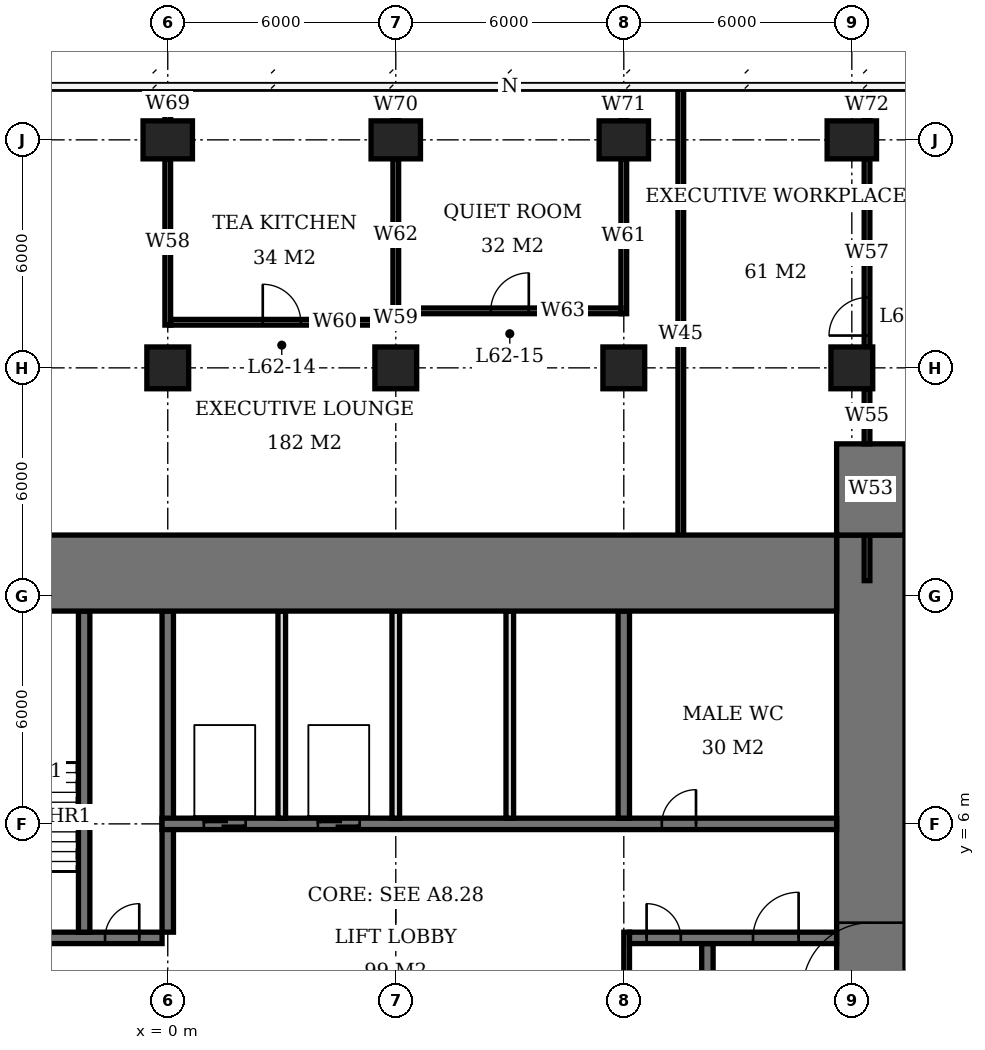
"""IFC4 building model, lengths in metres.
Left out: names, types, materials, properties, quantities, classifications, styles, units other than length and angle.
Written with IfcOpenShell. Run it as: python <this file> out.ifc"""

import sys

from ifc_helpers import new_model, si_unit, direction, frame, frame_2d, origin, origin_2d, place, context, subcontext, project, spatial, rectangle, extrude, element, fill, save


model = new_model("IFC4")
c1 = context("Model", 3, precision=1e-05, world=origin(), true_north=direction((0.0, 1.0)))
c2 = subcontext(c1, "Body", "Model", "MODEL_VIEW")
j1 = project(units=[si_unit("LENGTHUNIT", "METRE"), si_unit("PLANEANGLEUNIT", "RADIAN")], contexts=[c1])
p1 = place(None, origin())
s1 = spatial("IfcSite", under=j1, at=p1, CompositionType="ELEMENT")
p2 = place(p1, origin())
s2 = spatial("IfcBuilding", under=s1, at=p2, CompositionType="ELEMENT")
p3 = place(p2, frame((0.0, 0.0, 252.8)))
s3 = spatial("IfcBuildingStorey", under=s2, at=p3, CompositionType="ELEMENT", Elevation=252.8)
p4 = place(p3, frame((0.0, 18.0, 0.0), z_axis=(0.0, 0.0, 1.0), x_axis=(1.0, 0.0, 0.0)))
e1 = element("IfcColumn", 1, at=p4, inside=s3, PredefinedType="COLUMN", context=c2, shape_type="SweptSolid", body=[
    extrude(rectangle(XDim=1.1, YDim=1.1, at=origin_2d()), origin(), (0.0, 0.0, 1.0), 3.9),
])
p5 = place(p3, frame((0.0, 24.0, 0.0), z_axis=(0.0, 0.0, 1.0), x_axis=(1.0, 0.0, 0.0)))
e2 = element("IfcColumn", 2, at=p5, inside=s3, PredefinedType="COLUMN", context=c2, shape_type="SweptSolid", body=[
    extrude(rectangle(XDim=1.3, YDim=1.0, at=origin_2d()), origin(), (0.0, 0.0, 1.0), 3.9),
])
p6 = place(p3, frame((6.0, 18.0, 0.0), z_axis=(0.0, 0.0, 1.0), x_axis=(1.0, 0.0, 0.0)))
e3 = element("IfcColumn", 3, at=p6, inside=s3, PredefinedType="COLUMN", context=c2, shape_type="SweptSolid", body=[
    extrude(rectangle(XDim=1.1, YDim=1.1, at=origin_2d()), origin(), (0.0, 0.0, 1.0), 3.9),
])
p7 = place(p3, frame((6.0, 24.0, 0.0), z_axis=(0.0, 0.0, 1.0), x_axis=(1.0, 0.0, 0.0)))
e4 = element("IfcColumn", 4, at=p7, inside=s3, PredefinedType="COLUMN", context=c2, shape_type="SweptSolid", body=[
    extrude(rectangle(XDim=1.3, YDim=1.0, at=origin_2d()), origin(), (0.0, 0.0, 1.0), 3.9),
])
p8 = place(p3, frame((12.0, 18.0, 0.0), z_axis=(0.0, 0.0, 1.0), x_axis=(1.0, 0.0, 0.0)))
e5 = element("IfcColumn", 5, at=p8, inside=s3, PredefinedType="COLUMN", context=c2, shape_type="SweptSolid", body=[
    extrude(rectangle(XDim=1.1, YDim=1.1, at=origin_2d()), origin(), (0.0, 0.0, 1.0), 3.9),
])
p9 = place(p3, frame((12.0, 24.0, 0.0), z_axis=(0.0, 0.0, 1.0), x_axis=(1.0, 0.0, 0.0)))
e6 = element("IfcColumn", 6, at=p9, inside=s3, PredefinedType="COLUMN", context=c2, shape_type="SweptSolid", body=[
    extrude(rectangle(XDim=1.3, YDim=1.0, at=origin_2d()), origin(), (0.0, 0.0, 1.0), 3.9),
])
p10 = place(p3, frame((18.0, 18.0, 0.0), z_axis=(0.0, 0.0, 1.0), x_axis=(1.0, 0.0, 0.0)))
e7 = element("IfcColumn", 7, at=p10, inside=s3, PredefinedType="COLUMN", context=c2, shape_type="SweptSolid", body=[
    extrude(rectangle(XDim=1.1, YDim=1.1, at=origin_2d()), origin(), (0.0, 0.0, 1.0), 3.9),
])
p11 = place(p3, frame((18.0, 24.0, 0.0), z_axis=(0.0, 0.0, 1.0), x_axis=(1.0, 0.0, 0.0)))
e8 = element("IfcColumn", 8, at=p11, inside=s3, PredefinedType="COLUMN", context=c2, shape_type="SweptSolid", body=[
    extrude(rectangle(XDim=1.3, YDim=1.0, at=origin_2d()), origin(), (0.0, 0.0, 1.0), 3.9),
])
p12 = place(p3, frame((-5.6, 12.6, 0.0), z_axis=(0.0, 0.0, 1.0), x_axis=(1.0, 0.0, 0.0)))
e9 = element("IfcWall", 9, at=p12, inside=s3, PredefinedType="SHEAR", context=c2, shape_type="SweptSolid", body=[
    extrude(rectangle(XDim=23.2, YDim=2.0, at=frame_2d((11.6, 0.0))), origin(), (0.0, 0.0, 1.0), 3.9),
])
p13 = place(p3, frame((18.5, -7.6, 0.0), z_axis=(0.0, 0.0, 1.0), x_axis=(0.0, 1.0, 0.0)))
e10 = element("IfcWall", 10, at=p13, inside=s3, PredefinedType="SHEAR", context=c2, shape_type="SweptSolid", body=[
    extrude(rectangle(XDim=21.2, YDim=1.8, at=frame_2d((10.6, 0.0))), origin(), (0.0, 0.0, 1.0), 3.9),
])
p14 = place(p13, frame((9.2, 0.0, 0.0)))
e11 = element("IfcOpeningElement", 11, at=p14, cuts=e10, PredefinedType="OPENING", context=c2, shape_type="SweptSolid", body=[
    extrude(rectangle(XDim=1.8, YDim=2.4, at=frame_2d((0.9, 1.2))), frame((0.0, 0.91, 0.0), z_axis=(0.0, -1.0, 0.0), x_axis=(1.0, 0.0, 0.0)), (0.0, 0.0, 1.0), 1.82),
])
p15 = place(p3, frame((18.5, 13.6, 0.0), z_axis=(0.0, 0.0, 1.0), x_axis=(0.0, 1.0, 0.0)))
e12 = element("IfcWall", 12, at=p15, inside=s3, PredefinedType="SHEAR", context=c2, shape_type="SweptSolid", body=[
    extrude(rectangle(XDim=2.4, YDim=1.8, at=frame_2d((1.2, 0.0))), origin(), (0.0, 0.0, 1.0), 3.9),
])
p16 = place(p3, frame((-5.6, 3.0, 0.0), z_axis=(0.0, 0.0, 1.0), x_axis=(1.0, 0.0, 0.0)))
e13 = element("IfcWall", 13, at=p16, inside=s3, PredefinedType="SHEAR", context=c2, shape_type="SweptSolid", body=[
    extrude(rectangle(XDim=5.45, YDim=0.3, at=frame_2d((2.725, 0.0))), origin(), (0.0, 0.0, 1.0), 3.9),
])
p17 = place(p16, frame((0.4, 0.0, 0.0)))
e14 = element("IfcOpeningElement", 14, at=p17, cuts=e13, PredefinedType="OPENING", context=c2, shape_type="SweptSolid", body=[
    extrude(rectangle(XDim=1.2, YDim=2.1, at=frame_2d((0.6, 1.05))), frame((0.0, 0.16, 0.0), z_axis=(0.0, -1.0, 0.0), x_axis=(1.0, 0.0, 0.0)), (0.0, 0.0, 1.0), 0.32),
])
p18 = place(p16, frame((3.95, 0.0, 0.0)))
e15 = element("IfcOpeningElement", 15, at=p18, cuts=e13, PredefinedType="OPENING", context=c2, shape_type="SweptSolid", body=[
    extrude(rectangle(XDim=0.9, YDim=2.1, at=frame_2d((0.45, 1.05))), frame((0.0, 0.16, 0.0), z_axis=(0.0, -1.0, 0.0), x_axis=(1.0, 0.0, 0.0)), (0.0, 0.0, 1.0), 0.32),
])
p19 = place(p3, frame((12.15, 3.0, 0.0), z_axis=(0.0, 0.0, 1.0), x_axis=(1.0, 0.0, 0.0)))
e16 = element("IfcWall", 16, at=p19, inside=s3, PredefinedType="SHEAR", context=c2, shape_type="SweptSolid", body=[
    extrude(rectangle(XDim=5.45, YDim=0.3, at=frame_2d((2.725, 0.0))), origin(), (0.0, 0.0, 1.0), 3.9),
])
p20 = place(p19, frame((3.25, 0.0, 0.0)))
e17 = element("IfcOpeningElement", 17, at=p20, cuts=e16, PredefinedType="OPENING", context=c2, shape_type="SweptSolid", body=[
    extrude(rectangle(XDim=1.2, YDim=2.1, at=frame_2d((0.6, 1.05))), frame((0.0, 0.16, 0.0), z_axis=(0.0, -1.0, 0.0), x_axis=(1.0, 0.0, 0.0)), (0.0, 0.0, 1.0), 0.32),
])
p21 = place(p19, frame((0.45, 0.0, 0.0)))
e18 = element("IfcOpeningElement", 18, at=p21, cuts=e16, PredefinedType="OPENING", context=c2, shape_type="SweptSolid", body=[
    extrude(rectangle(XDim=0.9, YDim=2.1, at=frame_2d((0.45, 1.05))), frame((0.0, 0.16, 0.0), z_axis=(0.0, -1.0, 0.0), x_axis=(1.0, 0.0, 0.0)), (0.0, 0.0, 1.0), 0.32),
])
p22 = place(p3, frame((-0.15, 6.0, 0.0), z_axis=(0.0, 0.0, 1.0), x_axis=(1.0, 0.0, 0.0)))
e19 = element("IfcWall", 19, at=p22, inside=s3, PredefinedType="SHEAR", context=c2, shape_type="SweptSolid", body=[
    extrude(rectangle(XDim=17.75, YDim=0.3, at=frame_2d((8.875, 0.0))), origin(), (0.0, 0.0, 1.0), 3.9),
])
p23 = place(p22, frame((13.15, 0.0, 0.0)))
e20 = element("IfcOpeningElement", 20, at=p23, cuts=e19, PredefinedType="OPENING", context=c2, shape_type="SweptSolid", body=[
    extrude(rectangle(XDim=0.9, YDim=2.1, at=frame_2d((0.45, 1.05))), frame((0.0, 0.16, 0.0), z_axis=(0.0, -1.0, 0.0), x_axis=(1.0, 0.0, 0.0)), (0.0, 0.0, 1.0), 0.32),
])
p24 = place(p22, frame((1.1, 0.0, 0.0)))
e21 = element("IfcOpeningElement", 21, at=p24, cuts=e19, PredefinedType="OPENING", context=c2, shape_type="SweptSolid", body=[
    extrude(rectangle(XDim=1.1, YDim=2.1, at=frame_2d((0.55, 1.05))), frame((0.0, 0.16, 0.0), z_axis=(0.0, -1.0, 0.0), x_axis=(1.0, 0.0, 0.0)), (0.0, 0.0, 1.0), 0.32),
])
p25 = place(p22, frame((4.1, 0.0, 0.0)))
e22 = element("IfcOpeningElement", 22, at=p25, cuts=e19, PredefinedType="OPENING", context=c2, shape_type="SweptSolid", body=[
    extrude(rectangle(XDim=1.1, YDim=2.1, at=frame_2d((0.55, 1.05))), frame((0.0, 0.16, 0.0), z_axis=(0.0, -1.0, 0.0), x_axis=(1.0, 0.0, 0.0)), (0.0, 0.0, 1.0), 0.32),
])
p26 = place(p3, frame((0.0, 3.15, 0.0), z_axis=(0.0, 0.0, 1.0), x_axis=(0.0, 1.0, 0.0)))
e23 = element("IfcWall", 23, at=p26, inside=s3, PredefinedType="SHEAR", context=c2, shape_type="SweptSolid", body=[
    extrude(rectangle(XDim=8.45, YDim=0.3, at=frame_2d((4.225, 0.0))), origin(), (0.0, 0.0, 1.0), 3.9),
])
p27 = place(p3, frame((12.0, 6.15, 0.0), z_axis=(0.0, 0.0, 1.0), x_axis=(0.0, 1.0, 0.0)))
e24 = element("IfcWall", 24, at=p27, inside=s3, PredefinedType="SHEAR", context=c2, shape_type="SweptSolid", body=[
    extrude(rectangle(XDim=5.45, YDim=0.3, at=frame_2d((2.725, 0.0))), origin(), (0.0, 0.0, 1.0), 3.9),
])
for number, where, z_axis, x_axis in (
    (25, (-2.2, 3.15, 0.0), (0.0, 0.0, 1.0), (0.0, 1.0, 0.0)),
    (26, (14.2, -5.6, 0.0), (0.0, 0.0, 1.0), (0.0, 1.0, 0.0)),
):
    element("IfcWall", number, at=place(p3, frame(where, z_axis=z_axis, x_axis=x_axis)), inside=s3, PredefinedType="SHEAR", context=c2, shape_type="SweptSolid", body=[
        extrude(rectangle(XDim=8.45, YDim=0.3, at=frame_2d((4.225, 0.0))), origin(), (0.0, 0.0, 1.0), 3.9),
    ])
for number, where, z_axis, x_axis in (
    (27, (3.0, 6.15, 0.0), (0.0, 0.0, 1.0), (0.0, 1.0, 0.0)),
    (28, (6.0, 6.15, 0.0), (0.0, 0.0, 1.0), (0.0, 1.0, 0.0)),
    (29, (9.0, 6.15, 0.0), (0.0, 0.0, 1.0), (0.0, 1.0, 0.0)),
):
    element("IfcWall", number, at=place(p3, frame(where, z_axis=z_axis, x_axis=x_axis)), inside=s3, PredefinedType="SOLIDWALL", context=c2, shape_type="SweptSolid", body=[
        extrude(rectangle(XDim=5.45, YDim=0.2, at=frame_2d((2.725, 0.0))), origin(), (0.0, 0.0, 1.0), 3.9),
    ])
p28 = place(p3, frame((0.075, 19.2, 0.0), z_axis=(0.0, 0.0, 1.0), x_axis=(1.0, 0.0, 0.0)))
e30 = element("IfcWall", 30, at=p28, inside=s3, PredefinedType="PARTITIONING", context=c2, shape_type="SweptSolid", body=[
    extrude(rectangle(XDim=5.85, YDim=0.15, at=frame_2d((2.925, 0.0))), origin(), (0.0, 0.0, 1.0), 3.65),
])
p29 = place(p28, frame((2.425, 0.0, 0.0)))
e31 = element("IfcOpeningElement", 31, at=p29, cuts=e30, PredefinedType="OPENING", context=c2, shape_type="SweptSolid", body=[
    extrude(rectangle(XDim=1.0, YDim=2.4, at=frame_2d((0.5, 1.2))), frame((0.0, 0.085, 0.0), z_axis=(0.0, -1.0, 0.0), x_axis=(1.0, 0.0, 0.0)), (0.0, 0.0, 1.0), 0.17),
])
p30 = place(p3, frame((6.075, 19.5, 0.0), z_axis=(0.0, 0.0, 1.0), x_axis=(1.0, 0.0, 0.0)))
e32 = element("IfcWall", 32, at=p30, inside=s3, PredefinedType="PARTITIONING", context=c2, shape_type="SweptSolid", body=[
    extrude(rectangle(XDim=5.85, YDim=0.15, at=frame_2d((2.925, 0.0))), origin(), (0.0, 0.0, 1.0), 3.65),
])
p31 = place(p30, frame((2.425, 0.0, 0.0)))
e33 = element("IfcOpeningElement", 33, at=p31, cuts=e32, PredefinedType="OPENING", context=c2, shape_type="SweptSolid", body=[
    extrude(rectangle(XDim=1.0, YDim=2.4, at=frame_2d((0.5, 1.2))), frame((0.0, 0.085, 0.0), z_axis=(0.0, -1.0, 0.0), x_axis=(1.0, 0.0, 0.0)), (0.0, 0.0, 1.0), 0.17),
])
p32 = place(p3, frame((0.0, 19.125, 0.0), z_axis=(0.0, 0.0, 1.0), x_axis=(0.0, 1.0, 0.0)))
e34 = element("IfcWall", 34, at=p32, inside=s3, PredefinedType="PARTITIONING", context=c2, shape_type="SweptSolid", body=[
    extrude(rectangle(XDim=4.375, YDim=0.15, at=frame_2d((2.188, 0.0))), origin(), (0.0, 0.0, 1.0), 3.65),
])
p33 = place(p3, frame((0.0, 24.5, 0.0), z_axis=(0.0, 0.0, 1.0), x_axis=(0.0, 1.0, 0.0)))
e35 = element("IfcWall", 35, at=p33, inside=s3, PredefinedType="PARTITIONING", context=c2, shape_type="SweptSolid", body=[
    extrude(rectangle(XDim=0.875, YDim=0.15, at=frame_2d((0.438, 0.0))), origin(), (0.0, 0.0, 1.0), 3.65),
])
p34 = place(p3, frame((6.0, 19.125, 0.0), z_axis=(0.0, 0.0, 1.0), x_axis=(0.0, 1.0, 0.0)))
e36 = element("IfcWall", 36, at=p34, inside=s3, PredefinedType="PARTITIONING", context=c2, shape_type="SweptSolid", body=[
    extrude(rectangle(XDim=0.375, YDim=0.15, at=frame_2d((0.188, 0.0))), origin(), (0.0, 0.0, 1.0), 3.65),
])
p35 = place(p3, frame((6.0, 19.5, 0.0), z_axis=(0.0, 0.0, 1.0), x_axis=(0.0, 1.0, 0.0)))
e37 = element("IfcWall", 37, at=p35, inside=s3, PredefinedType="PARTITIONING", context=c2, shape_type="SweptSolid", body=[
    extrude(rectangle(XDim=4.0, YDim=0.15, at=frame_2d((2.0, 0.0))), origin(), (0.0, 0.0, 1.0), 3.65),
])
p36 = place(p3, frame((6.0, 24.5, 0.0), z_axis=(0.0, 0.0, 1.0), x_axis=(0.0, 1.0, 0.0)))
e38 = element("IfcWall", 38, at=p36, inside=s3, PredefinedType="PARTITIONING", context=c2, shape_type="SweptSolid", body=[
    extrude(rectangle(XDim=0.85, YDim=0.15, at=frame_2d((0.425, 0.0))), origin(), (0.0, 0.0, 1.0), 3.65),
])
p37 = place(p3, frame((12.0, 19.425, 0.0), z_axis=(0.0, 0.0, 1.0), x_axis=(0.0, 1.0, 0.0)))
e39 = element("IfcWall", 39, at=p37, inside=s3, PredefinedType="PARTITIONING", context=c2, shape_type="SweptSolid", body=[
    extrude(rectangle(XDim=4.075, YDim=0.15, at=frame_2d((2.038, 0.0))), origin(), (0.0, 0.0, 1.0), 3.65),
])
p38 = place(p3, frame((12.0, 24.5, 0.0), z_axis=(0.0, 0.0, 1.0), x_axis=(0.0, 1.0, 0.0)))
e40 = element("IfcWall", 40, at=p38, inside=s3, PredefinedType="PARTITIONING", context=c2, shape_type="SweptSolid", body=[
    extrude(rectangle(XDim=0.85, YDim=0.15, at=frame_2d((0.425, 0.0))), origin(), (0.0, 0.0, 1.0), 3.65),
])
p39 = place(p3, frame((13.5, 12.4, 0.0), z_axis=(0.0, 0.0, 1.0), x_axis=(0.0, 1.0, 0.0)))
e41 = element("IfcWall", 41, at=p39, inside=s3, PredefinedType="PARTITIONING", context=c2, shape_type="SweptSolid", body=[
    extrude(rectangle(XDim=12.975, YDim=0.15, at=frame_2d((6.488, 0.0))), origin(), (0.0, 0.0, 1.0), 3.65),
])
p40 = place(p3, frame((18.4, 12.4, 0.0), z_axis=(0.0, 0.0, 1.0), x_axis=(0.0, 1.0, 0.0)))
e42 = element("IfcWall", 42, at=p40, inside=s3, PredefinedType="PARTITIONING", context=c2, shape_type="SweptSolid", body=[
    extrude(rectangle(XDim=1.2, YDim=0.15, at=frame_2d((0.6, 0.0))), origin(), (0.0, 0.0, 1.0), 3.65),
])
p41 = place(p3, frame((18.4, 16.0, 0.0), z_axis=(0.0, 0.0, 1.0), x_axis=(0.0, 1.0, 0.0)))
e43 = element("IfcWall", 43, at=p41, inside=s3, PredefinedType="PARTITIONING", context=c2, shape_type="SweptSolid", body=[
    extrude(rectangle(XDim=1.45, YDim=0.15, at=frame_2d((0.725, 0.0))), origin(), (0.0, 0.0, 1.0), 3.65),
])
p42 = place(p3, frame((18.4, 18.55, 0.0), z_axis=(0.0, 0.0, 1.0), x_axis=(0.0, 1.0, 0.0)))
e44 = element("IfcWall", 44, at=p42, inside=s3, PredefinedType="PARTITIONING", context=c2, shape_type="SweptSolid", body=[
    extrude(rectangle(XDim=4.95, YDim=0.15, at=frame_2d((2.475, 0.0))), origin(), (0.0, 0.0, 1.0), 3.65),
])
p43 = place(p42, frame((0.3, 0.0, 0.0)))
e45 = element("IfcOpeningElement", 45, at=p43, cuts=e44, PredefinedType="OPENING", context=c2, shape_type="SweptSolid", body=[
    extrude(rectangle(XDim=1.0, YDim=2.4, at=frame_2d((0.5, 1.2))), frame((0.0, 0.085, 0.0), z_axis=(0.0, -1.0, 0.0), x_axis=(1.0, 0.0, 0.0)), (0.0, 0.0, 1.0), 0.17),
])
p44 = place(p3, frame((18.4, 24.5, 0.0), z_axis=(0.0, 0.0, 1.0), x_axis=(0.0, 1.0, 0.0)))
e46 = element("IfcWall", 46, at=p44, inside=s3, PredefinedType="PARTITIONING", context=c2, shape_type="SweptSolid", body=[
    extrude(rectangle(XDim=0.85, YDim=0.15, at=frame_2d((0.425, 0.0))), origin(), (0.0, 0.0, 1.0), 3.65),
])
p45 = place(p3, frame((12.075, 0.15, 0.0), z_axis=(0.0, 0.0, 1.0), x_axis=(0.0, 1.0, 0.0)))
e47 = element("IfcWall", 47, at=p45, inside=s3, PredefinedType="PARTITIONING", context=c2, shape_type="SweptSolid", body=[
    extrude(rectangle(XDim=3.0, YDim=0.15, at=frame_2d((1.5, 0.0))), origin(), (0.0, 0.0, 1.0), 3.65),
])
p46 = place(p14, origin())
e48 = element("IfcDoor", 48, at=p46, inside=s3, OperationType="DOUBLE_DOOR_SINGLE_SWING", PredefinedType="DOOR", context=c2, shape_type="SweptSolid", body=[
    extrude(rectangle(XDim=1.8, YDim=2.4, at=frame_2d((0.9, 1.2))), frame((0.0, 0.025, 0.0), z_axis=(0.0, -1.0, 0.0), x_axis=(1.0, 0.0, 0.0)), (0.0, 0.0, 1.0), 0.05),
])
fill(e11, e48)
p47 = place(p18, origin())
e49 = element("IfcDoor", 49, at=p47, inside=s3, OperationType="SINGLE_SWING_RIGHT", PredefinedType="DOOR", context=c2, shape_type="SweptSolid", body=[
    extrude(rectangle(XDim=0.9, YDim=2.1, at=frame_2d((0.45, 1.05))), frame((0.0, 0.025, 0.0), z_axis=(0.0, -1.0, 0.0), x_axis=(1.0, 0.0, 0.0)), (0.0, 0.0, 1.0), 0.05),
])
fill(e15, e49)
p48 = place(p20, origin())
e50 = element("IfcDoor", 50, at=p48, inside=s3, OperationType="SINGLE_SWING_RIGHT", PredefinedType="DOOR", context=c2, shape_type="SweptSolid", body=[
    extrude(rectangle(XDim=1.2, YDim=2.1, at=frame_2d((0.6, 1.05))), frame((0.0, 0.025, 0.0), z_axis=(0.0, -1.0, 0.0), x_axis=(1.0, 0.0, 0.0)), (0.0, 0.0, 1.0), 0.05),
])
fill(e17, e50)
p49 = place(p21, origin())
e51 = element("IfcDoor", 51, at=p49, inside=s3, OperationType="SINGLE_SWING_LEFT", PredefinedType="DOOR", context=c2, shape_type="SweptSolid", body=[
    extrude(rectangle(XDim=0.9, YDim=2.1, at=frame_2d((0.45, 1.05))), frame((0.0, 0.025, 0.0), z_axis=(0.0, -1.0, 0.0), x_axis=(1.0, 0.0, 0.0)), (0.0, 0.0, 1.0), 0.05),
])
fill(e18, e51)
p50 = place(p23, origin())
e52 = element("IfcDoor", 52, at=p50, inside=s3, OperationType="SINGLE_SWING_RIGHT", PredefinedType="DOOR", context=c2, shape_type="SweptSolid", body=[
    extrude(rectangle(XDim=0.9, YDim=2.1, at=frame_2d((0.45, 1.05))), frame((0.0, 0.025, 0.0), z_axis=(0.0, -1.0, 0.0), x_axis=(1.0, 0.0, 0.0)), (0.0, 0.0, 1.0), 0.05),
])
fill(e20, e52)
p51 = place(p24, origin())
e53 = element("IfcDoor", 53, at=p51, inside=s3, OperationType="DOUBLE_DOOR_SLIDING", PredefinedType="USERDEFINED", context=c2, shape_type="SweptSolid", body=[
    extrude(rectangle(XDim=1.1, YDim=2.1, at=frame_2d((0.55, 1.05))), frame((0.0, 0.025, 0.0), z_axis=(0.0, -1.0, 0.0), x_axis=(1.0, 0.0, 0.0)), (0.0, 0.0, 1.0), 0.05),
])
fill(e21, e53)
p52 = place(p25, origin())
e54 = element("IfcDoor", 54, at=p52, inside=s3, OperationType="DOUBLE_DOOR_SLIDING", PredefinedType="USERDEFINED", context=c2, shape_type="SweptSolid", body=[
    extrude(rectangle(XDim=1.1, YDim=2.1, at=frame_2d((0.55, 1.05))), frame((0.0, 0.025, 0.0), z_axis=(0.0, -1.0, 0.0), x_axis=(1.0, 0.0, 0.0)), (0.0, 0.0, 1.0), 0.05),
])
fill(e22, e54)
p53 = place(p29, origin())
e55 = element("IfcDoor", 55, at=p53, inside=s3, OperationType="SINGLE_SWING_LEFT", PredefinedType="DOOR", context=c2, shape_type="SweptSolid", body=[
    extrude(rectangle(XDim=1.0, YDim=2.4, at=frame_2d((0.5, 1.2))), frame((0.0, 0.025, 0.0), z_axis=(0.0, -1.0, 0.0), x_axis=(1.0, 0.0, 0.0)), (0.0, 0.0, 1.0), 0.05),
])
fill(e31, e55)
p54 = place(p31, origin())
e56 = element("IfcDoor", 56, at=p54, inside=s3, OperationType="SINGLE_SWING_RIGHT", PredefinedType="DOOR", context=c2, shape_type="SweptSolid", body=[
    extrude(rectangle(XDim=1.0, YDim=2.4, at=frame_2d((0.5, 1.2))), frame((0.0, 0.025, 0.0), z_axis=(0.0, -1.0, 0.0), x_axis=(1.0, 0.0, 0.0)), (0.0, 0.0, 1.0), 0.05),
])
fill(e33, e56)
p55 = place(p43, origin())
e57 = element("IfcDoor", 57, at=p55, inside=s3, OperationType="SINGLE_SWING_LEFT", PredefinedType="DOOR", context=c2, shape_type="SweptSolid", body=[
    extrude(rectangle(XDim=1.0, YDim=2.4, at=frame_2d((0.5, 1.2))), frame((0.0, 0.025, 0.0), z_axis=(0.0, -1.0, 0.0), x_axis=(1.0, 0.0, 0.0)), (0.0, 0.0, 1.0), 0.05),
])
fill(e45, e57)
save(model, sys.argv[1])
